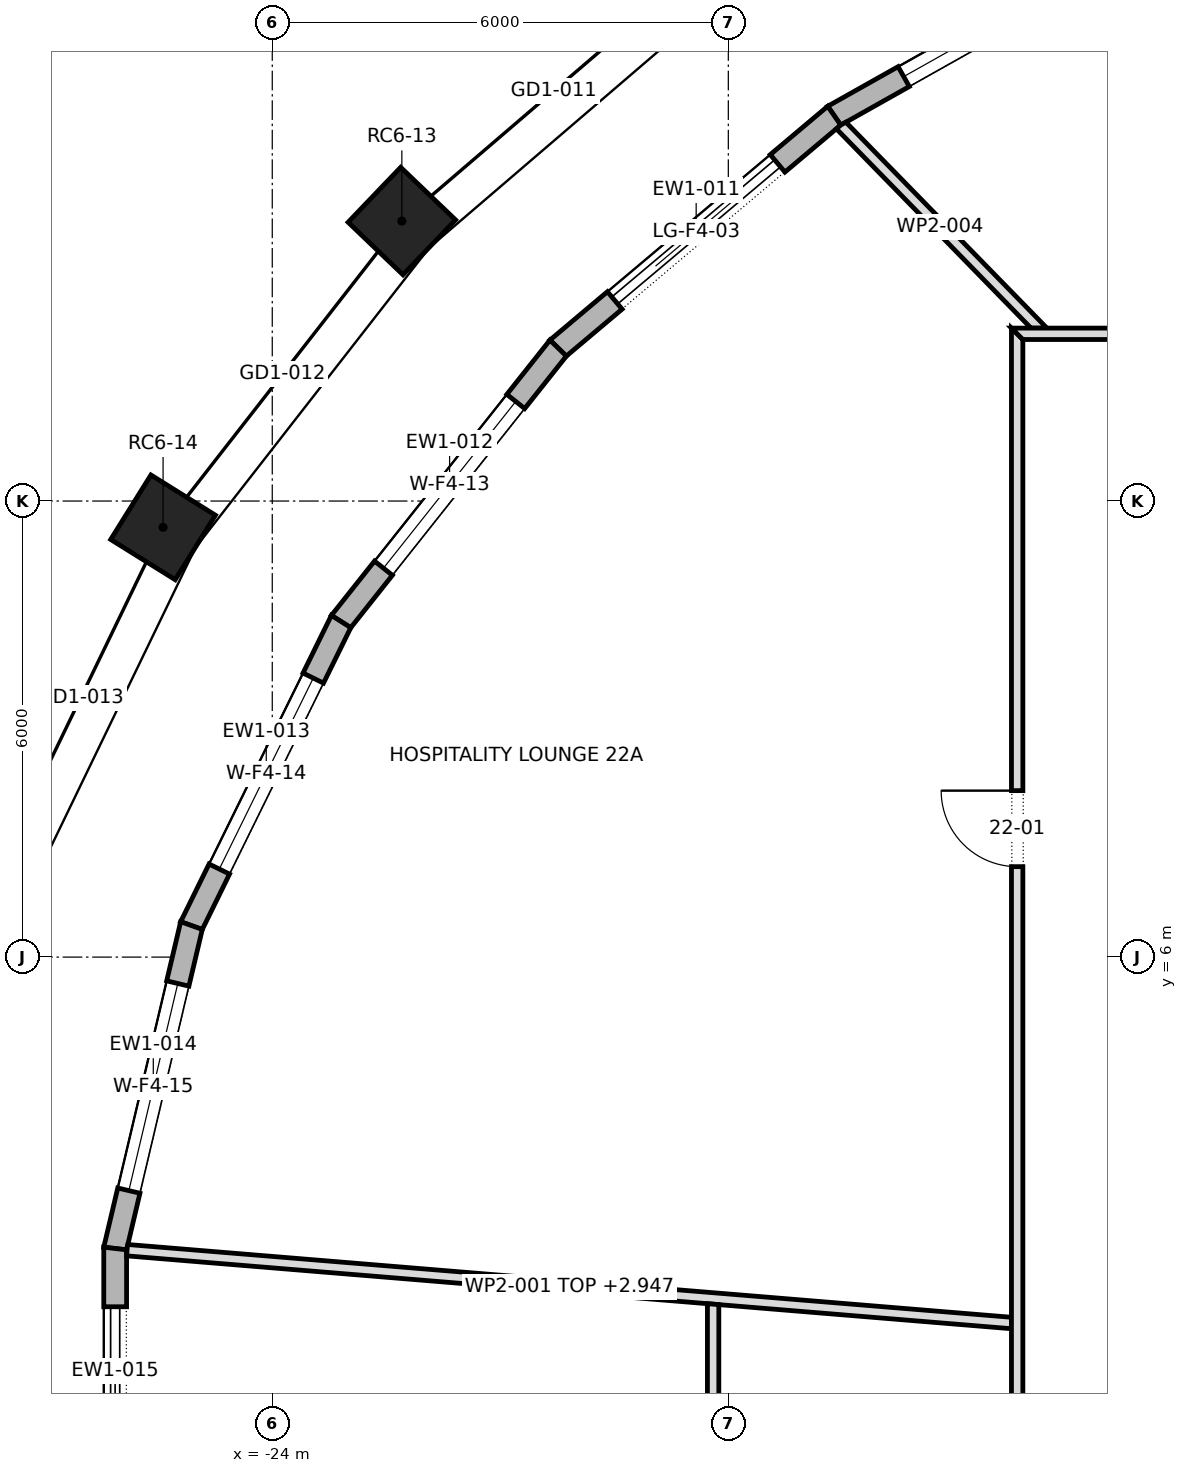
"""IFC4 building model, lengths in metres.
Left out: names, types, materials, properties, quantities, classifications, styles, units other than length and angle.
Written with IfcOpenShell. Run it as: python <this file> out.ifc"""

import sys

from ifc_helpers import new_model, si_unit, direction, frame, frame_2d, origin, origin_2d, place, context, subcontext, project, spatial, polyline, rectangle, outline, extrude, element, fill, save


model = new_model("IFC4")
c1 = context("Model", 3, precision=1e-05, world=origin(), true_north=direction((0.0, 1.0)))
c2 = subcontext(c1, "Body", "Model", "MODEL_VIEW")
j1 = project(units=[si_unit("LENGTHUNIT", "METRE"), si_unit("PLANEANGLEUNIT", "RADIAN")], contexts=[c1])
p1 = place(None, origin())
s1 = spatial("IfcSite", under=j1, at=p1, CompositionType="ELEMENT")
p2 = place(p1, origin())
s2 = spatial("IfcBuilding", under=s1, at=p2, CompositionType="ELEMENT")
p3 = place(p2, frame((0.0, 0.0, 304.3)))
s3 = spatial("IfcBuildingStorey", under=s2, at=p3, CompositionType="ELEMENT", Elevation=304.3)
for number, where, z_axis, x_axis in (
    (1, (-22.295, 15.683, 0.0), (0.0, 0.0, 1.0), (-0.692, -0.722, 0.0)),
    (2, (-25.437, 11.654, 0.0), (0.0, 0.0, 1.0), (-0.529, -0.849, 0.0)),
):
    element("IfcColumn", number, at=place(p3, frame(where, z_axis=z_axis, x_axis=x_axis)), inside=s3, PredefinedType="COLUMN", context=c2, shape_type="SweptSolid", body=[
        extrude(rectangle(XDim=1.0, YDim=1.0, at=origin_2d()), origin(), (0.0, 0.0, 1.0), 4.0),
    ])
p4 = place(p3, frame((-12.338, 19.471, 0.0), z_axis=(0.0, 0.0, 1.0), x_axis=(-0.871570211895, -0.490270706588, 0.0)))
e3 = element("IfcWall", 3, at=p4, inside=s3, PredefinedType="STANDARD", context=c2, shape_type="SweptSolid", body=[
    extrude(outline(polyline([(-0.013, -0.15), (4.912, -0.15), (4.883, 0.15), (0.013, 0.15), (-0.013, -0.15)])), origin(), (0.0, 0.0, 1.0), 3.7),
])
p5 = place(p4, frame((1.049, 0.0, 0.6)))
e4 = element("IfcOpeningElement", 4, at=p5, cuts=e3, PredefinedType="OPENING", context=c2, shape_type="SweptSolid", body=[
    extrude(rectangle(XDim=2.8, YDim=2.65, at=frame_2d((1.4, 1.325))), frame((0.0, 0.162, 0.0), z_axis=(0.0, -1.0, 0.0), x_axis=(1.0, 0.0, 0.0)), (0.0, 0.0, 1.0), 0.324),
])
p6 = place(p3, frame((-16.607, 17.07, 0.0), z_axis=(0.0, 0.0, 1.0), x_axis=(-0.765059193792, -0.643959959931, 0.0)))
e5 = element("IfcWall", 5, at=p6, inside=s3, PredefinedType="STANDARD", context=c2, shape_type="SweptSolid", body=[
    extrude(outline(polyline([(-0.014, -0.15), (4.763, -0.15), (4.733, 0.15), (0.014, 0.15), (-0.014, -0.15)])), origin(), (0.0, 0.0, 1.0), 3.7),
])
p7 = place(p6, frame((0.974, 0.0, 0.0)))
e6 = element("IfcOpeningElement", 6, at=p7, cuts=e5, PredefinedType="OPENING", context=c2, shape_type="SweptSolid", body=[
    extrude(rectangle(XDim=2.8, YDim=3.25, at=frame_2d((1.4, 1.625))), frame((0.0, 0.162, 0.0), z_axis=(0.0, -1.0, 0.0), x_axis=(1.0, 0.0, 0.0)), (0.0, 0.0, 1.0), 0.324),
])
p8 = place(p3, frame((-20.239, 14.012, 0.0), z_axis=(0.0, 0.0, 1.0), x_axis=(-0.621682706372, -0.78326918272, 0.0)))
e7 = element("IfcWall", 7, at=p8, inside=s3, PredefinedType="STANDARD", context=c2, shape_type="SweptSolid", body=[
    extrude(outline(polyline([(-0.015, -0.15), (4.609, -0.15), (4.577, 0.15), (0.015, 0.15), (-0.015, -0.15)])), origin(), (0.0, 0.0, 1.0), 3.7),
])
p9 = place(p8, frame((0.896, 0.0, 0.6)))
e8 = element("IfcOpeningElement", 8, at=p9, cuts=e7, PredefinedType="OPENING", context=c2, shape_type="SweptSolid", body=[
    extrude(rectangle(XDim=2.8, YDim=2.65, at=frame_2d((1.4, 1.325))), frame((0.0, 0.162, 0.0), z_axis=(0.0, -1.0, 0.0), x_axis=(1.0, 0.0, 0.0)), (0.0, 0.0, 1.0), 0.324),
])
p10 = place(p3, frame((-23.094, 10.415, 0.0), z_axis=(0.0, 0.0, 1.0), x_axis=(-0.441509050872, -0.897256796017, 0.0)))
e9 = element("IfcWall", 9, at=p10, inside=s3, PredefinedType="STANDARD", context=c2, shape_type="SweptSolid", body=[
    extrude(outline(polyline([(-0.016, -0.15), (4.475, -0.15), (4.441, 0.15), (0.016, 0.15), (-0.016, -0.15)])), origin(), (0.0, 0.0, 1.0), 3.7),
])
p11 = place(p10, frame((0.829, 0.0, 0.6)))
e10 = element("IfcOpeningElement", 10, at=p11, cuts=e9, PredefinedType="OPENING", context=c2, shape_type="SweptSolid", body=[
    extrude(rectangle(XDim=2.8, YDim=2.65, at=frame_2d((1.4, 1.325))), frame((0.0, 0.162, 0.0), z_axis=(0.0, -1.0, 0.0), x_axis=(1.0, 0.0, 0.0)), (0.0, 0.0, 1.0), 0.324),
])
p12 = place(p3, frame((-25.063, 6.415, 0.0), z_axis=(0.0, 0.0, 1.0), x_axis=(-0.229974411334, -0.973196675977, 0.0)))
e11 = element("IfcWall", 11, at=p12, inside=s3, PredefinedType="STANDARD", context=c2, shape_type="SweptSolid", body=[
    extrude(outline(polyline([(-0.017, -0.15), (4.383, -0.15), (4.348, 0.15), (0.017, 0.15), (-0.017, -0.15)])), origin(), (0.0, 0.0, 1.0), 3.7),
])
p13 = place(p12, frame((0.783, 0.0, 0.6)))
e12 = element("IfcOpeningElement", 12, at=p13, cuts=e11, PredefinedType="OPENING", context=c2, shape_type="SweptSolid", body=[
    extrude(rectangle(XDim=2.8, YDim=2.65, at=frame_2d((1.4, 1.325))), frame((0.0, 0.162, 0.0), z_axis=(0.0, -1.0, 0.0), x_axis=(1.0, 0.0, 0.0)), (0.0, 0.0, 1.0), 0.324),
])
p14 = place(p3, frame((-26.067, 2.166, 0.0), z_axis=(0.0, 0.0, 1.0), x_axis=(0.0, -1.0, 0.0)))
e13 = element("IfcWall", 13, at=p14, inside=s3, PredefinedType="STANDARD", context=c2, shape_type="SweptSolid", body=[
    extrude(outline(polyline([(-0.018, -0.15), (4.35, -0.15), (4.315, 0.15), (0.018, 0.15), (-0.018, -0.15)])), origin(), (0.0, 0.0, 1.0), 3.7),
])
p15 = place(p14, frame((0.766, 0.0, 0.0)))
e14 = element("IfcOpeningElement", 14, at=p15, cuts=e13, PredefinedType="OPENING", context=c2, shape_type="SweptSolid", body=[
    extrude(rectangle(XDim=2.8, YDim=3.25, at=frame_2d((1.4, 1.625))), frame((0.0, 0.162, 0.0), z_axis=(0.0, -1.0, 0.0), x_axis=(1.0, 0.0, 0.0)), (0.0, 0.0, 1.0), 0.324),
])
p16 = place(p3, frame((-25.91, 2.145, 0.0), z_axis=(0.0, 0.0, 1.0), x_axis=(0.996625584757, -0.082081933503, 0.0)))
e15 = element("IfcWall", 15, at=p16, inside=s3, PredefinedType="PARTITIONING", context=c2, shape_type="SweptSolid", body=[
    extrude(outline(polyline([(11.68, -0.075), (11.68, -0.068), (11.668, 0.075), (9.724, 0.075), (7.78, 0.075), (5.836, 0.075), (3.892, 0.075), (1.948, 0.075), (0.004, 0.075), (0.0, 0.049), (0.0, -0.075), (1.947, -0.075), (3.893, -0.075), (5.84, -0.075), (7.787, -0.075), (9.733, -0.075), (11.68, -0.075)])), origin(), (0.0, 0.0, 1.0), 2.947),
])
p17 = place(p3, frame((-18.2, -4.593, 0.0), z_axis=(0.0, 0.0, 1.0), x_axis=(0.0, 1.0, 0.0)))
e16 = element("IfcWall", 16, at=p17, inside=s3, PredefinedType="PARTITIONING", context=c2, shape_type="SweptSolid", body=[
    extrude(outline(polyline([(0.038, -0.075), (2.032, -0.075), (4.026, -0.075), (6.021, -0.075), (6.032, 0.07), (6.032, 0.075), (4.524, 0.075), (3.016, 0.075), (1.508, 0.075), (0.0, 0.075), (0.0, 0.075), (0.038, -0.075)])), origin(), (0.0, 0.0, 1.0), 3.7),
])
p18 = place(p17, frame((2.522, 0.0, 0.0)))
e17 = element("IfcOpeningElement", 17, at=p18, cuts=e16, PredefinedType="OPENING", context=c2, shape_type="SweptSolid", body=[
    extrude(rectangle(XDim=1.0, YDim=2.1, at=frame_2d((0.5, 1.05))), frame((0.0, 0.087, 0.0), z_axis=(0.0, -1.0, 0.0), x_axis=(1.0, 0.0, 0.0)), (0.0, 0.0, 1.0), 0.174),
])
p19 = place(p3, frame((-16.525, 16.95, 0.0), z_axis=(0.0, 0.0, 1.0), x_axis=(0.698599984797, -0.715512446602, 0.0)))
e18 = element("IfcWall", 18, at=p19, inside=s3, PredefinedType="PARTITIONING", context=c2, shape_type="SweptSolid", body=[
    extrude(outline(polyline([(0.0, -0.075), (1.833, -0.075), (3.665, -0.075), (3.811, 0.075), (3.811, 0.075), (1.918, 0.075), (0.025, 0.075), (0.005, 0.0), (0.0, -0.074), (0.0, -0.075)])), origin(), (0.0, 0.0, 1.0), 3.7),
])
p20 = place(p3, frame((-14.2, -14.275, 0.0), z_axis=(0.0, 0.0, 1.0), x_axis=(0.0, 1.0, 0.0)))
e19 = element("IfcWall", 19, at=p20, inside=s3, PredefinedType="PARTITIONING", context=c2, shape_type="SweptSolid", body=[
    extrude(outline(polyline([(0.15, -0.075), (2.033, -0.075), (3.917, -0.075), (5.8, -0.075), (7.683, -0.075), (9.567, -0.075), (11.45, -0.075), (13.333, -0.075), (15.217, -0.075), (17.1, -0.075), (18.983, -0.075), (20.866, -0.075), (22.75, -0.075), (24.633, -0.075), (26.517, -0.075), (28.4, -0.075), (28.55, 0.075), (28.55, 0.075), (26.646, 0.075), (24.743, 0.075), (22.84, 0.075), (20.937, 0.075), (19.033, 0.075), (17.13, 0.075), (15.227, 0.075), (13.323, 0.075), (11.42, 0.075), (9.517, 0.075), (7.613, 0.075), (5.71, 0.075), (3.807, 0.075), (1.903, 0.075), (0.0, 0.075), (0.15, -0.075)])), origin(), (0.0, 0.0, 1.0), 3.7),
])
p21 = place(p20, frame((21.465, 0.0, 0.0)))
e20 = element("IfcOpeningElement", 20, at=p21, cuts=e19, PredefinedType="OPENING", context=c2, shape_type="SweptSolid", body=[
    extrude(rectangle(XDim=1.0, YDim=2.1, at=frame_2d((0.5, 1.05))), frame((0.0, 0.087, 0.0), z_axis=(0.0, -1.0, 0.0), x_axis=(1.0, 0.0, 0.0)), (0.0, 0.0, 1.0), 0.174),
])
p22 = place(p20, frame((12.55, 0.0, 0.0)))
e21 = element("IfcOpeningElement", 21, at=p22, cuts=e19, PredefinedType="OPENING", context=c2, shape_type="SweptSolid", body=[
    extrude(rectangle(XDim=1.0, YDim=2.1, at=frame_2d((0.5, 1.05))), frame((0.0, 0.087, 0.0), z_axis=(0.0, -1.0, 0.0), x_axis=(1.0, 0.0, 0.0)), (0.0, 0.0, 1.0), 0.174),
])
p23 = place(p20, frame((7.055, 0.0, 0.0)))
e22 = element("IfcOpeningElement", 22, at=p23, cuts=e19, PredefinedType="OPENING", context=c2, shape_type="SweptSolid", body=[
    extrude(rectangle(XDim=1.0, YDim=2.1, at=frame_2d((0.5, 1.05))), frame((0.0, 0.087, 0.0), z_axis=(0.0, -1.0, 0.0), x_axis=(1.0, 0.0, 0.0)), (0.0, 0.0, 1.0), 0.174),
])
p24 = place(p3, frame((-14.275, 14.2, 0.0), z_axis=(0.0, 0.0, 1.0), x_axis=(1.0, 0.0, 0.0)))
e23 = element("IfcWall", 23, at=p24, inside=s3, PredefinedType="PARTITIONING", context=c2, shape_type="SweptSolid", body=[
    extrude(outline(polyline([(0.15, -0.075), (2.033, -0.075), (3.917, -0.075), (5.8, -0.075), (7.683, -0.075), (9.567, -0.075), (11.45, -0.075), (13.333, -0.075), (15.217, -0.075), (17.1, -0.075), (18.983, -0.075), (20.866, -0.075), (22.75, -0.075), (24.633, -0.075), (26.517, -0.075), (28.4, -0.075), (28.55, 0.075), (28.55, 0.075), (26.646, 0.075), (24.743, 0.075), (22.84, 0.075), (20.937, 0.075), (19.033, 0.075), (17.13, 0.075), (15.227, 0.075), (13.323, 0.075), (11.42, 0.075), (9.517, 0.075), (7.613, 0.075), (5.71, 0.075), (3.807, 0.075), (1.903, 0.075), (0.0, 0.075), (0.15, -0.075)])), origin(), (0.0, 0.0, 1.0), 3.7),
])
p25 = place(p24, frame((20.045, 0.0, 0.0)))
e24 = element("IfcOpeningElement", 24, at=p25, cuts=e23, PredefinedType="OPENING", context=c2, shape_type="SweptSolid", body=[
    extrude(rectangle(XDim=1.0, YDim=2.1, at=frame_2d((0.5, 1.05))), frame((0.0, 0.087, 0.0), z_axis=(0.0, -1.0, 0.0), x_axis=(1.0, 0.0, 0.0)), (0.0, 0.0, 1.0), 0.174),
])
p26 = place(p24, frame((6.025, 0.0, 0.0)))
e25 = element("IfcOpeningElement", 25, at=p26, cuts=e23, PredefinedType="OPENING", context=c2, shape_type="SweptSolid", body=[
    extrude(rectangle(XDim=1.0, YDim=2.1, at=frame_2d((0.5, 1.05))), frame((0.0, 0.087, 0.0), z_axis=(0.0, -1.0, 0.0), x_axis=(1.0, 0.0, 0.0)), (0.0, 0.0, 1.0), 0.174),
])
p27 = place(p5, origin())
e26 = element("IfcWindow", 26, at=p27, inside=s3, PartitioningType="DOUBLE_PANEL_VERTICAL", PredefinedType="WINDOW", context=c2, shape_type="SweptSolid", body=[
    extrude(rectangle(XDim=2.8, YDim=2.65, at=frame_2d((1.4, 1.325))), frame((0.0, 0.03, 0.0), z_axis=(0.0, -1.0, 0.0), x_axis=(1.0, 0.0, 0.0)), (0.0, 0.0, 1.0), 0.06),
])
fill(e4, e26)
p28 = place(p7, origin())
e27 = element("IfcDoor", 27, at=p28, inside=s3, OperationType="DOUBLE_DOOR_SLIDING", PredefinedType="DOOR", context=c2, shape_type="SweptSolid", body=[
    extrude(rectangle(XDim=2.8, YDim=3.25, at=frame_2d((1.4, 1.625))), frame((0.0, 0.025, 0.0), z_axis=(0.0, -1.0, 0.0), x_axis=(1.0, 0.0, 0.0)), (0.0, 0.0, 1.0), 0.05),
])
fill(e6, e27)
p29 = place(p9, origin())
e28 = element("IfcWindow", 28, at=p29, inside=s3, PartitioningType="DOUBLE_PANEL_VERTICAL", PredefinedType="WINDOW", context=c2, shape_type="SweptSolid", body=[
    extrude(rectangle(XDim=2.8, YDim=2.65, at=frame_2d((1.4, 1.325))), frame((0.0, 0.03, 0.0), z_axis=(0.0, -1.0, 0.0), x_axis=(1.0, 0.0, 0.0)), (0.0, 0.0, 1.0), 0.06),
])
fill(e8, e28)
p30 = place(p11, origin())
e29 = element("IfcWindow", 29, at=p30, inside=s3, PartitioningType="DOUBLE_PANEL_VERTICAL", PredefinedType="WINDOW", context=c2, shape_type="SweptSolid", body=[
    extrude(rectangle(XDim=2.8, YDim=2.65, at=frame_2d((1.4, 1.325))), frame((0.0, 0.03, 0.0), z_axis=(0.0, -1.0, 0.0), x_axis=(1.0, 0.0, 0.0)), (0.0, 0.0, 1.0), 0.06),
])
fill(e10, e29)
p31 = place(p13, origin())
e30 = element("IfcWindow", 30, at=p31, inside=s3, PartitioningType="DOUBLE_PANEL_VERTICAL", PredefinedType="WINDOW", context=c2, shape_type="SweptSolid", body=[
    extrude(rectangle(XDim=2.8, YDim=2.65, at=frame_2d((1.4, 1.325))), frame((0.0, 0.03, 0.0), z_axis=(0.0, -1.0, 0.0), x_axis=(1.0, 0.0, 0.0)), (0.0, 0.0, 1.0), 0.06),
])
fill(e12, e30)
p32 = place(p15, origin())
e31 = element("IfcDoor", 31, at=p32, inside=s3, OperationType="DOUBLE_DOOR_SLIDING", PredefinedType="DOOR", context=c2, shape_type="SweptSolid", body=[
    extrude(rectangle(XDim=2.8, YDim=3.25, at=frame_2d((1.4, 1.625))), frame((0.0, 0.025, 0.0), z_axis=(0.0, -1.0, 0.0), x_axis=(1.0, 0.0, 0.0)), (0.0, 0.0, 1.0), 0.05),
])
fill(e14, e31)
p33 = place(p21, origin())
e32 = element("IfcDoor", 32, at=p33, inside=s3, OperationType="SINGLE_SWING_LEFT", PredefinedType="DOOR", context=c2, shape_type="SweptSolid", body=[
    extrude(rectangle(XDim=1.0, YDim=2.1, at=frame_2d((0.5, 1.05))), frame((0.0, 0.025, 0.0), z_axis=(0.0, -1.0, 0.0), x_axis=(1.0, 0.0, 0.0)), (0.0, 0.0, 1.0), 0.05),
])
fill(e20, e32)
save(model, sys.argv[1])
